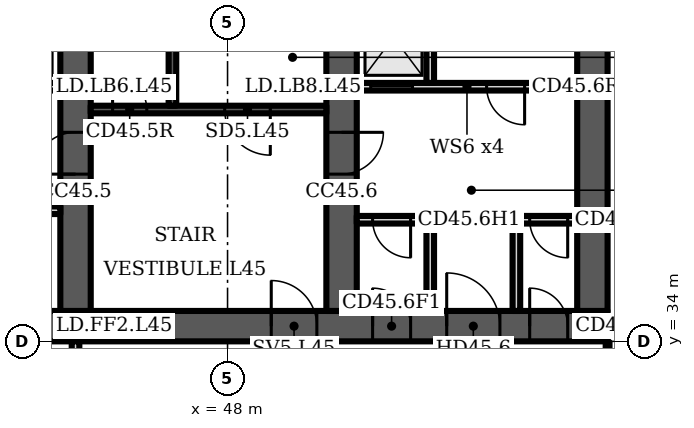
"""IFC4 building model, lengths in metres.
Left out: names, types, materials, properties, quantities, classifications, styles, units other than length and angle.
Written with IfcOpenShell. Run it as: python <this file> out.ifc"""

import sys

from ifc_helpers import new_model, si_unit, direction, frame, frame_2d, origin, place, context, subcontext, project, spatial, polyline, rectangle, outline, extrude, element, fill, save


model = new_model("IFC4")
c1 = context("Model", 3, precision=1e-05, world=origin(), true_north=direction((0.0, 1.0)))
c2 = subcontext(c1, "Body", "Model", "MODEL_VIEW")
j1 = project(units=[si_unit("LENGTHUNIT", "METRE"), si_unit("PLANEANGLEUNIT", "RADIAN")], contexts=[c1])
p1 = place(None, origin())
s1 = spatial("IfcSite", under=j1, at=p1, CompositionType="ELEMENT")
p2 = place(p1, origin())
s2 = spatial("IfcBuilding", under=s1, at=p2, CompositionType="ELEMENT")
p3 = place(p2, frame((0.0, 0.0, 184.3)))
s3 = spatial("IfcBuildingStorey", under=s2, at=p3, CompositionType="ELEMENT", Elevation=184.3)
p4 = place(p3, frame((16.0, 34.4, 0.0), z_axis=(0.0, 0.0, 1.0), x_axis=(1.0, 0.0, 0.0)))
e1 = element("IfcWall", 1, at=p4, inside=s3, PredefinedType="SHEAR", context=c2, shape_type="SweptSolid", body=[
    extrude(rectangle(XDim=42.0, YDim=0.8, at=frame_2d((21.0, 0.0))), origin(), (0.0, 0.0, 1.0), 3.6),
])
p5 = place(p4, frame((1.75, 0.0, 0.0)))
e2 = element("IfcOpeningElement", 2, at=p5, cuts=e1, PredefinedType="OPENING", context=c2, shape_type="SweptSolid", body=[
    extrude(rectangle(XDim=1.0, YDim=2.1, at=frame_2d((0.5, 1.05))), frame((0.0, 0.41, 0.0), z_axis=(0.0, -1.0, 0.0), x_axis=(1.0, 0.0, 0.0)), (0.0, 0.0, 1.0), 0.82),
])
p6 = place(p4, frame((4.65, 0.0, 0.0)))
e3 = element("IfcOpeningElement", 3, at=p6, cuts=e1, PredefinedType="OPENING", context=c2, shape_type="SweptSolid", body=[
    extrude(rectangle(XDim=1.0, YDim=2.1, at=frame_2d((0.5, 1.05))), frame((0.0, 0.41, 0.0), z_axis=(0.0, -1.0, 0.0), x_axis=(1.0, 0.0, 0.0)), (0.0, 0.0, 1.0), 0.82),
])
p7 = place(p4, frame((7.65, 0.0, 0.0)))
e4 = element("IfcOpeningElement", 4, at=p7, cuts=e1, PredefinedType="OPENING", context=c2, shape_type="SweptSolid", body=[
    extrude(rectangle(XDim=1.2, YDim=2.1, at=frame_2d((0.6, 1.05))), frame((0.0, 0.41, 0.0), z_axis=(0.0, -1.0, 0.0), x_axis=(1.0, 0.0, 0.0)), (0.0, 0.0, 1.0), 0.82),
])
p8 = place(p4, frame((14.767, 0.0, 0.0)))
e5 = element("IfcOpeningElement", 5, at=p8, cuts=e1, PredefinedType="OPENING", context=c2, shape_type="SweptSolid", body=[
    extrude(rectangle(XDim=1.1, YDim=2.1, at=frame_2d((0.55, 1.05))), frame((0.0, 0.41, 0.0), z_axis=(0.0, -1.0, 0.0), x_axis=(1.0, 0.0, 0.0)), (0.0, 0.0, 1.0), 0.82),
])
p9 = place(p4, frame((19.133, 0.0, 0.0)))
e6 = element("IfcOpeningElement", 6, at=p9, cuts=e1, PredefinedType="OPENING", context=c2, shape_type="SweptSolid", body=[
    extrude(rectangle(XDim=1.1, YDim=2.1, at=frame_2d((0.55, 1.05))), frame((0.0, 0.41, 0.0), z_axis=(0.0, -1.0, 0.0), x_axis=(1.0, 0.0, 0.0)), (0.0, 0.0, 1.0), 0.82),
])
p10 = place(p4, frame((16.8, 0.0, 0.0)))
e7 = element("IfcOpeningElement", 7, at=p10, cuts=e1, PredefinedType="OPENING", context=c2, shape_type="SweptSolid", body=[
    extrude(rectangle(XDim=1.4, YDim=2.1, at=frame_2d((0.7, 1.05))), frame((0.0, 0.41, 0.0), z_axis=(0.0, -1.0, 0.0), x_axis=(1.0, 0.0, 0.0)), (0.0, 0.0, 1.0), 0.82),
])
p11 = place(p4, frame((21.767, 0.0, 0.0)))
e8 = element("IfcOpeningElement", 8, at=p11, cuts=e1, PredefinedType="OPENING", context=c2, shape_type="SweptSolid", body=[
    extrude(rectangle(XDim=1.1, YDim=2.1, at=frame_2d((0.55, 1.05))), frame((0.0, 0.41, 0.0), z_axis=(0.0, -1.0, 0.0), x_axis=(1.0, 0.0, 0.0)), (0.0, 0.0, 1.0), 0.82),
])
p12 = place(p4, frame((23.95, 0.0, 0.0)))
e9 = element("IfcOpeningElement", 9, at=p12, cuts=e1, PredefinedType="OPENING", context=c2, shape_type="SweptSolid", body=[
    extrude(rectangle(XDim=1.1, YDim=2.1, at=frame_2d((0.55, 1.05))), frame((0.0, 0.41, 0.0), z_axis=(0.0, -1.0, 0.0), x_axis=(1.0, 0.0, 0.0)), (0.0, 0.0, 1.0), 0.82),
])
p13 = place(p4, frame((26.133, 0.0, 0.0)))
e10 = element("IfcOpeningElement", 10, at=p13, cuts=e1, PredefinedType="OPENING", context=c2, shape_type="SweptSolid", body=[
    extrude(rectangle(XDim=1.1, YDim=2.1, at=frame_2d((0.55, 1.05))), frame((0.0, 0.41, 0.0), z_axis=(0.0, -1.0, 0.0), x_axis=(1.0, 0.0, 0.0)), (0.0, 0.0, 1.0), 0.82),
])
p14 = place(p4, frame((33.15, 0.0, 0.0)))
e11 = element("IfcOpeningElement", 11, at=p14, cuts=e1, PredefinedType="OPENING", context=c2, shape_type="SweptSolid", body=[
    extrude(rectangle(XDim=1.2, YDim=2.1, at=frame_2d((0.6, 1.05))), frame((0.0, 0.41, 0.0), z_axis=(0.0, -1.0, 0.0), x_axis=(1.0, 0.0, 0.0)), (0.0, 0.0, 1.0), 0.82),
])
p15 = place(p4, frame((35.817, 0.0, 0.0)))
e12 = element("IfcOpeningElement", 12, at=p15, cuts=e1, PredefinedType="OPENING", context=c2, shape_type="SweptSolid", body=[
    extrude(rectangle(XDim=1.0, YDim=2.1, at=frame_2d((0.5, 1.05))), frame((0.0, 0.41, 0.0), z_axis=(0.0, -1.0, 0.0), x_axis=(1.0, 0.0, 0.0)), (0.0, 0.0, 1.0), 0.82),
])
p16 = place(p4, frame((39.95, 0.0, 0.0)))
e13 = element("IfcOpeningElement", 13, at=p16, cuts=e1, PredefinedType="OPENING", context=c2, shape_type="SweptSolid", body=[
    extrude(rectangle(XDim=1.0, YDim=2.1, at=frame_2d((0.5, 1.05))), frame((0.0, 0.41, 0.0), z_axis=(0.0, -1.0, 0.0), x_axis=(1.0, 0.0, 0.0)), (0.0, 0.0, 1.0), 0.82),
])
p17 = place(p4, frame((37.767, 0.0, 0.0)))
e14 = element("IfcOpeningElement", 14, at=p17, cuts=e1, PredefinedType="OPENING", context=c2, shape_type="SweptSolid", body=[
    extrude(rectangle(XDim=1.4, YDim=2.1, at=frame_2d((0.7, 1.05))), frame((0.0, 0.41, 0.0), z_axis=(0.0, -1.0, 0.0), x_axis=(1.0, 0.0, 0.0)), (0.0, 0.0, 1.0), 0.82),
])
p18 = place(p3, frame((44.0, 34.8, 0.0), z_axis=(0.0, 0.0, 1.0), x_axis=(0.0, 1.0, 0.0)))
e15 = element("IfcWall", 15, at=p18, inside=s3, PredefinedType="SHEAR", context=c2, shape_type="SweptSolid", body=[
    extrude(rectangle(XDim=14.374, YDim=0.8, at=frame_2d((7.187, 0.0))), origin(), (0.0, 0.0, 1.0), 3.6),
])
p19 = place(p18, frame((11.312, 0.0, 0.0)))
e16 = element("IfcOpeningElement", 16, at=p19, cuts=e15, PredefinedType="OPENING", context=c2, shape_type="SweptSolid", body=[
    extrude(rectangle(XDim=1.0, YDim=2.1, at=frame_2d((0.5, 1.05))), frame((0.0, 0.41, 0.0), z_axis=(0.0, -1.0, 0.0), x_axis=(1.0, 0.0, 0.0)), (0.0, 0.0, 1.0), 0.82),
])
p20 = place(p18, frame((3.6, 0.0, 0.0)))
e17 = element("IfcOpeningElement", 17, at=p20, cuts=e15, PredefinedType="OPENING", context=c2, shape_type="SweptSolid", body=[
    extrude(rectangle(XDim=1.1, YDim=2.1, at=frame_2d((0.55, 1.05))), frame((0.0, 0.41, 0.0), z_axis=(0.0, -1.0, 0.0), x_axis=(1.0, 0.0, 0.0)), (0.0, 0.0, 1.0), 0.82),
])
p21 = place(p3, frame((51.0, 34.8, 0.0), z_axis=(0.0, 0.0, 1.0), x_axis=(0.0, 1.0, 0.0)))
e18 = element("IfcWall", 18, at=p21, inside=s3, PredefinedType="SHEAR", context=c2, shape_type="SweptSolid", body=[
    extrude(rectangle(XDim=13.762, YDim=0.8, at=frame_2d((6.881, 0.0))), origin(), (0.0, 0.0, 1.0), 3.6),
])
p22 = place(p21, frame((3.6, 0.0, 0.0)))
e19 = element("IfcOpeningElement", 19, at=p22, cuts=e18, PredefinedType="OPENING", context=c2, shape_type="SweptSolid", body=[
    extrude(rectangle(XDim=1.1, YDim=2.1, at=frame_2d((0.55, 1.05))), frame((0.0, 0.41, 0.0), z_axis=(0.0, -1.0, 0.0), x_axis=(1.0, 0.0, 0.0)), (0.0, 0.0, 1.0), 0.82),
])
p23 = place(p3, frame((57.6, 34.8, 0.0), z_axis=(0.0, 0.0, 1.0), x_axis=(0.0, 1.0, 0.0)))
e20 = element("IfcWall", 20, at=p23, inside=s3, PredefinedType="SHEAR", context=c2, shape_type="SweptSolid", body=[
    extrude(rectangle(XDim=13.184, YDim=0.8, at=frame_2d((6.592, 0.0))), origin(), (0.0, 0.0, 1.0), 3.6),
])
p24 = place(p3, frame((37.4, 40.7, 0.0), z_axis=(0.0, 0.0, 1.0), x_axis=(1.0, 0.0, 0.0)))
e21 = element("IfcWall", 21, at=p24, inside=s3, PredefinedType="PARTITIONING", context=c2, shape_type="SweptSolid", body=[
    extrude(rectangle(XDim=6.2, YDim=0.2, at=frame_2d((3.1, 0.0))), origin(), (0.0, 0.0, 1.0), 3.2),
])
p25 = place(p24, frame((0.367, 0.0, 0.0)))
e22 = element("IfcOpeningElement", 22, at=p25, cuts=e21, PredefinedType="OPENING", context=c2, shape_type="SweptSolid", body=[
    extrude(rectangle(XDim=1.1, YDim=2.1, at=frame_2d((0.55, 1.05))), frame((0.0, 0.11, 0.0), z_axis=(0.0, -1.0, 0.0), x_axis=(1.0, 0.0, 0.0)), (0.0, 0.0, 1.0), 0.22),
])
p26 = place(p24, frame((2.55, 0.0, 0.0)))
e23 = element("IfcOpeningElement", 23, at=p26, cuts=e21, PredefinedType="OPENING", context=c2, shape_type="SweptSolid", body=[
    extrude(rectangle(XDim=1.1, YDim=2.1, at=frame_2d((0.55, 1.05))), frame((0.0, 0.11, 0.0), z_axis=(0.0, -1.0, 0.0), x_axis=(1.0, 0.0, 0.0)), (0.0, 0.0, 1.0), 0.22),
])
p27 = place(p24, frame((4.733, 0.0, 0.0)))
e24 = element("IfcOpeningElement", 24, at=p27, cuts=e21, PredefinedType="OPENING", context=c2, shape_type="SweptSolid", body=[
    extrude(rectangle(XDim=1.1, YDim=2.1, at=frame_2d((0.55, 1.05))), frame((0.0, 0.11, 0.0), z_axis=(0.0, -1.0, 0.0), x_axis=(1.0, 0.0, 0.0)), (0.0, 0.0, 1.0), 0.22),
])
p28 = place(p3, frame((0.0, 0.0, -0.0)))
e25 = element("IfcWall", 25, at=p28, inside=s3, PredefinedType="PARTITIONING", context=c2, shape_type="SweptSolid", body=[
    extrude(outline(polyline([(41.567, 37.1), (39.433, 37.1), (39.433, 34.8), (39.233, 34.8), (39.233, 37.65), (37.4, 37.65), (37.4, 37.85), (39.233, 37.85), (39.433, 37.85), (39.433, 37.3), (41.567, 37.3), (41.567, 37.55), (41.767, 37.55), (43.6, 37.55), (43.6, 37.35), (41.767, 37.35), (41.767, 34.8), (41.567, 34.8), (41.567, 37.1)])), origin(), (0.0, 0.0, 1.0), 3.2),
])
p29 = place(p3, frame((0.0, 0.0, -0.0)))
e26 = element("IfcWall", 26, at=p29, inside=s3, PredefinedType="PARTITIONING", context=c2, shape_type="SweptSolid", body=[
    extrude(outline(polyline([(39.433, 40.8), (39.233, 40.8), (39.233, 43.8), (37.4, 43.8), (37.4, 44.0), (43.6, 44.0), (43.6, 43.8), (41.767, 43.8), (41.767, 40.8), (41.567, 40.8), (41.567, 43.8), (39.433, 43.8), (39.433, 40.8)])), origin(), (0.0, 0.0, 1.0), 3.2),
])
p30 = place(p3, frame((44.4, 40.1, 0.0), z_axis=(0.0, 0.0, 1.0), x_axis=(1.0, 0.0, 0.0)))
e27 = element("IfcWall", 27, at=p30, inside=s3, PredefinedType="SHEAR", context=c2, shape_type="SweptSolid", body=[
    extrude(rectangle(XDim=6.2, YDim=0.2, at=frame_2d((3.1, 0.0))), origin(), (0.0, 0.0, 1.0), 3.2),
])
p31 = place(p30, frame((3.525, 0.0, 0.0)))
e28 = element("IfcOpeningElement", 28, at=p31, cuts=e27, PredefinedType="OPENING", context=c2, shape_type="SweptSolid", body=[
    extrude(rectangle(XDim=1.2, YDim=2.1, at=frame_2d((0.6, 1.05))), frame((0.0, 0.11, 0.0), z_axis=(0.0, -1.0, 0.0), x_axis=(1.0, 0.0, 0.0)), (0.0, 0.0, 1.0), 0.22),
])
p32 = place(p30, frame((0.575, 0.0, 0.0)))
e29 = element("IfcOpeningElement", 29, at=p32, cuts=e27, PredefinedType="OPENING", context=c2, shape_type="SweptSolid", body=[
    extrude(rectangle(XDim=0.9, YDim=2.1, at=frame_2d((0.45, 1.05))), frame((0.0, 0.11, 0.0), z_axis=(0.0, -1.0, 0.0), x_axis=(1.0, 0.0, 0.0)), (0.0, 0.0, 1.0), 0.22),
])
p33 = place(p3, frame((46.55, 40.2, 0.0), z_axis=(0.0, 0.0, 1.0), x_axis=(0.0, 1.0, 0.0)))
e30 = element("IfcWall", 30, at=p33, inside=s3, PredefinedType="SHEAR", context=c2, shape_type="SweptSolid", body=[
    extrude(rectangle(XDim=7.2, YDim=0.2, at=frame_2d((3.6, 0.0))), origin(), (0.0, 0.0, 1.0), 3.2),
])
p34 = place(p3, frame((51.4, 37.2, 0.0), z_axis=(0.0, 0.0, 1.0), x_axis=(1.0, 0.0, 0.0)))
e31 = element("IfcWall", 31, at=p34, inside=s3, PredefinedType="PARTITIONING", context=c2, shape_type="SweptSolid", body=[
    extrude(rectangle(XDim=1.833, YDim=0.2, at=frame_2d((0.917, 0.0))), origin(), (0.0, 0.0, 1.0), 3.2),
])
p35 = place(p34, frame((0.417, 0.0, 0.0)))
e32 = element("IfcOpeningElement", 32, at=p35, cuts=e31, PredefinedType="OPENING", context=c2, shape_type="SweptSolid", body=[
    extrude(rectangle(XDim=1.0, YDim=2.1, at=frame_2d((0.5, 1.05))), frame((0.0, 0.11, 0.0), z_axis=(0.0, -1.0, 0.0), x_axis=(1.0, 0.0, 0.0)), (0.0, 0.0, 1.0), 0.22),
])
p36 = place(p3, frame((55.7, 37.2, 0.0), z_axis=(0.0, 0.0, 1.0), x_axis=(1.0, 0.0, 0.0)))
e33 = element("IfcWall", 33, at=p36, inside=s3, PredefinedType="PARTITIONING", context=c2, shape_type="SweptSolid", body=[
    extrude(rectangle(XDim=1.5, YDim=0.2, at=frame_2d((0.75, 0.0))), origin(), (0.0, 0.0, 1.0), 3.2),
])
p37 = place(p36, frame((0.25, 0.0, 0.0)))
e34 = element("IfcOpeningElement", 34, at=p37, cuts=e33, PredefinedType="OPENING", context=c2, shape_type="SweptSolid", body=[
    extrude(rectangle(XDim=1.0, YDim=2.1, at=frame_2d((0.5, 1.05))), frame((0.0, 0.11, 0.0), z_axis=(0.0, -1.0, 0.0), x_axis=(1.0, 0.0, 0.0)), (0.0, 0.0, 1.0), 0.22),
])
p38 = place(p3, frame((51.4, 40.7, 0.0), z_axis=(0.0, 0.0, 1.0), x_axis=(1.0, 0.0, 0.0)))
e35 = element("IfcWall", 35, at=p38, inside=s3, PredefinedType="PARTITIONING", context=c2, shape_type="SweptSolid", body=[
    extrude(rectangle(XDim=5.8, YDim=0.2, at=frame_2d((2.9, 0.0))), origin(), (0.0, 0.0, 1.0), 3.2),
])
p39 = place(p38, frame((0.367, 0.0, 0.0)))
e36 = element("IfcOpeningElement", 36, at=p39, cuts=e35, PredefinedType="OPENING", context=c2, shape_type="SweptSolid", body=[
    extrude(rectangle(XDim=1.1, YDim=2.1, at=frame_2d((0.55, 1.05))), frame((0.0, 0.11, 0.0), z_axis=(0.0, -1.0, 0.0), x_axis=(1.0, 0.0, 0.0)), (0.0, 0.0, 1.0), 0.22),
])
p40 = place(p38, frame((3.417, 0.0, 0.0)))
e37 = element("IfcOpeningElement", 37, at=p40, cuts=e35, PredefinedType="OPENING", context=c2, shape_type="SweptSolid", body=[
    extrude(rectangle(XDim=1.0, YDim=2.1, at=frame_2d((0.5, 1.05))), frame((0.0, 0.11, 0.0), z_axis=(0.0, -1.0, 0.0), x_axis=(1.0, 0.0, 0.0)), (0.0, 0.0, 1.0), 0.22),
])
p41 = place(p3, frame((0.0, 0.0, -0.0)))
e38 = element("IfcWall", 38, at=p41, inside=s3, PredefinedType="PARTITIONING", context=c2, shape_type="SweptSolid", body=[
    extrude(outline(polyline([(53.233, 34.8), (53.233, 37.3), (53.433, 37.3), (53.433, 34.8), (53.233, 34.8)])), origin(), (0.0, 0.0, 1.0), 3.2),
])
p42 = place(p3, frame((0.0, 0.0, -0.0)))
e39 = element("IfcWall", 39, at=p42, inside=s3, PredefinedType="PARTITIONING", context=c2, shape_type="SweptSolid", body=[
    extrude(outline(polyline([(55.5, 34.8), (55.5, 37.3), (55.7, 37.3), (55.7, 34.8), (55.5, 34.8)])), origin(), (0.0, 0.0, 1.0), 3.2),
])
p43 = place(p3, frame((0.0, 0.0, -0.0)))
e40 = element("IfcWall", 40, at=p43, inside=s3, PredefinedType="PARTITIONING", context=c2, shape_type="SweptSolid", body=[
    extrude(outline(polyline([(53.433, 40.8), (53.433, 43.8), (53.233, 43.8), (53.233, 40.8), (53.433, 40.8)])), origin(), (0.0, 0.0, 1.0), 3.2),
])
p44 = place(p3, frame((44.0, 30.5, 0.0), z_axis=(0.0, 0.0, 1.0), x_axis=(0.0, 1.0, 0.0)))
e41 = element("IfcWall", 41, at=p44, inside=s3, PredefinedType="PARTITIONING", context=c2, shape_type="SweptSolid", body=[
    extrude(rectangle(XDim=3.5, YDim=0.2, at=frame_2d((1.75, 0.0))), origin(), (0.0, 0.0, 1.0), 3.2),
])
p45 = place(p44, frame((1.2, 0.0, 0.0)))
e42 = element("IfcOpeningElement", 42, at=p45, cuts=e41, PredefinedType="OPENING", context=c2, shape_type="SweptSolid", body=[
    extrude(rectangle(XDim=1.1, YDim=2.1, at=frame_2d((0.55, 1.05))), frame((0.0, 0.11, 0.0), z_axis=(0.0, -1.0, 0.0), x_axis=(1.0, 0.0, 0.0)), (0.0, 0.0, 1.0), 0.22),
])
p46 = place(p3, frame((58.0, 31.925, 0.0), z_axis=(0.0, 0.0, 1.0), x_axis=(0.0, 1.0, 0.0)))
e43 = element("IfcWall", 43, at=p46, inside=s3, PredefinedType="PARTITIONING", context=c2, shape_type="SweptSolid", body=[
    extrude(rectangle(XDim=2.055, YDim=0.1, at=frame_2d((1.027, 0.0))), origin(), (0.0, 0.0, 1.0), 3.2),
])
p47 = place(p31, origin())
e44 = element("IfcDoor", 44, at=p47, inside=s3, OperationType="SINGLE_SWING_RIGHT", PredefinedType="DOOR", context=c2, shape_type="SweptSolid", body=[
    extrude(rectangle(XDim=1.2, YDim=2.1, at=frame_2d((0.6, 1.05))), frame((0.0, 0.025, 0.0), z_axis=(0.0, -1.0, 0.0), x_axis=(1.0, 0.0, 0.0)), (0.0, 0.0, 1.0), 0.05),
])
fill(e28, e44)
p48 = place(p32, origin())
e45 = element("IfcDoor", 45, at=p48, inside=s3, OperationType="SINGLE_SWING_LEFT", PredefinedType="DOOR", context=c2, shape_type="SweptSolid", body=[
    extrude(rectangle(XDim=0.9, YDim=2.1, at=frame_2d((0.45, 1.05))), frame((0.0, 0.025, 0.0), z_axis=(0.0, -1.0, 0.0), x_axis=(1.0, 0.0, 0.0)), (0.0, 0.0, 1.0), 0.05),
])
fill(e29, e45)
p49 = place(p14, origin())
e46 = element("IfcDoor", 46, at=p49, inside=s3, OperationType="SINGLE_SWING_LEFT", PredefinedType="DOOR", context=c2, shape_type="SweptSolid", body=[
    extrude(rectangle(XDim=1.2, YDim=2.1, at=frame_2d((0.6, 1.05))), frame((0.0, 0.025, 0.0), z_axis=(0.0, -1.0, 0.0), x_axis=(1.0, 0.0, 0.0)), (0.0, 0.0, 1.0), 0.05),
])
fill(e11, e46)
p50 = place(p15, origin())
e47 = element("IfcDoor", 47, at=p50, inside=s3, OperationType="SINGLE_SWING_LEFT", PredefinedType="DOOR", context=c2, shape_type="SweptSolid", body=[
    extrude(rectangle(XDim=1.0, YDim=2.1, at=frame_2d((0.5, 1.05))), frame((0.0, 0.4, 0.0), z_axis=(0.0, -1.0, 0.0), x_axis=(1.0, 0.0, 0.0)), (0.0, 0.0, 1.0), 0.8),
])
fill(e12, e47)
p51 = place(p35, origin())
e48 = element("IfcDoor", 48, at=p51, inside=s3, OperationType="SINGLE_SWING_RIGHT", PredefinedType="DOOR", context=c2, shape_type="SweptSolid", body=[
    extrude(rectangle(XDim=1.0, YDim=2.1, at=frame_2d((0.5, 1.05))), frame((0.0, 0.025, 0.0), z_axis=(0.0, -1.0, 0.0), x_axis=(1.0, 0.0, 0.0)), (0.0, 0.0, 1.0), 0.05),
])
fill(e32, e48)
p52 = place(p16, origin())
e49 = element("IfcDoor", 49, at=p52, inside=s3, OperationType="SINGLE_SWING_LEFT", PredefinedType="DOOR", context=c2, shape_type="SweptSolid", body=[
    extrude(rectangle(XDim=1.0, YDim=2.1, at=frame_2d((0.5, 1.05))), frame((0.0, 0.4, 0.0), z_axis=(0.0, -1.0, 0.0), x_axis=(1.0, 0.0, 0.0)), (0.0, 0.0, 1.0), 0.8),
])
fill(e13, e49)
p53 = place(p37, origin())
e50 = element("IfcDoor", 50, at=p53, inside=s3, OperationType="SINGLE_SWING_RIGHT", PredefinedType="DOOR", context=c2, shape_type="SweptSolid", body=[
    extrude(rectangle(XDim=1.0, YDim=2.1, at=frame_2d((0.5, 1.05))), frame((0.0, 0.025, 0.0), z_axis=(0.0, -1.0, 0.0), x_axis=(1.0, 0.0, 0.0)), (0.0, 0.0, 1.0), 0.05),
])
fill(e34, e50)
p54 = place(p17, origin())
e51 = element("IfcDoor", 51, at=p54, inside=s3, OperationType="DOUBLE_DOOR_SINGLE_SWING", PredefinedType="DOOR", context=c2, shape_type="SweptSolid", body=[
    extrude(rectangle(XDim=1.4, YDim=2.1, at=frame_2d((0.7, 1.05))), frame((0.0, 0.025, 0.0), z_axis=(0.0, -1.0, 0.0), x_axis=(1.0, 0.0, 0.0)), (0.0, 0.0, 1.0), 0.05),
])
fill(e14, e51)
p55 = place(p39, origin())
e52 = element("IfcDoor", 52, at=p55, inside=s3, OperationType="DOUBLE_DOOR_SLIDING", PredefinedType="DOOR", context=c2, shape_type="SweptSolid", body=[
    extrude(rectangle(XDim=1.1, YDim=2.1, at=frame_2d((0.55, 1.05))), frame((0.0, 0.025, 0.0), z_axis=(0.0, -1.0, 0.0), x_axis=(1.0, 0.0, 0.0)), (0.0, 0.0, 1.0), 0.05),
])
fill(e36, e52)
p56 = place(p40, origin())
e53 = element("IfcDoor", 53, at=p56, inside=s3, OperationType="SINGLE_SWING_RIGHT", PredefinedType="DOOR", context=c2, shape_type="SweptSolid", body=[
    extrude(rectangle(XDim=1.0, YDim=2.1, at=frame_2d((0.5, 1.05))), frame((0.0, 0.025, 0.0), z_axis=(0.0, -1.0, 0.0), x_axis=(1.0, 0.0, 0.0)), (0.0, 0.0, 1.0), 0.05),
])
fill(e37, e53)
p57 = place(p20, origin())
e54 = element("IfcDoor", 54, at=p57, inside=s3, OperationType="SINGLE_SWING_LEFT", PredefinedType="DOOR", context=c2, shape_type="SweptSolid", body=[
    extrude(rectangle(XDim=1.1, YDim=2.1, at=frame_2d((0.55, 1.05))), frame((0.0, 0.025, 0.0), z_axis=(0.0, -1.0, 0.0), x_axis=(1.0, 0.0, 0.0)), (0.0, 0.0, 1.0), 0.05),
])
fill(e17, e54)
p58 = place(p22, origin())
e55 = element("IfcDoor", 55, at=p58, inside=s3, OperationType="SINGLE_SWING_RIGHT", PredefinedType="DOOR", context=c2, shape_type="SweptSolid", body=[
    extrude(rectangle(XDim=1.1, YDim=2.1, at=frame_2d((0.55, 1.05))), frame((0.0, 0.025, 0.0), z_axis=(0.0, -1.0, 0.0), x_axis=(1.0, 0.0, 0.0)), (0.0, 0.0, 1.0), 0.05),
])
fill(e19, e55)
save(model, sys.argv[1])
